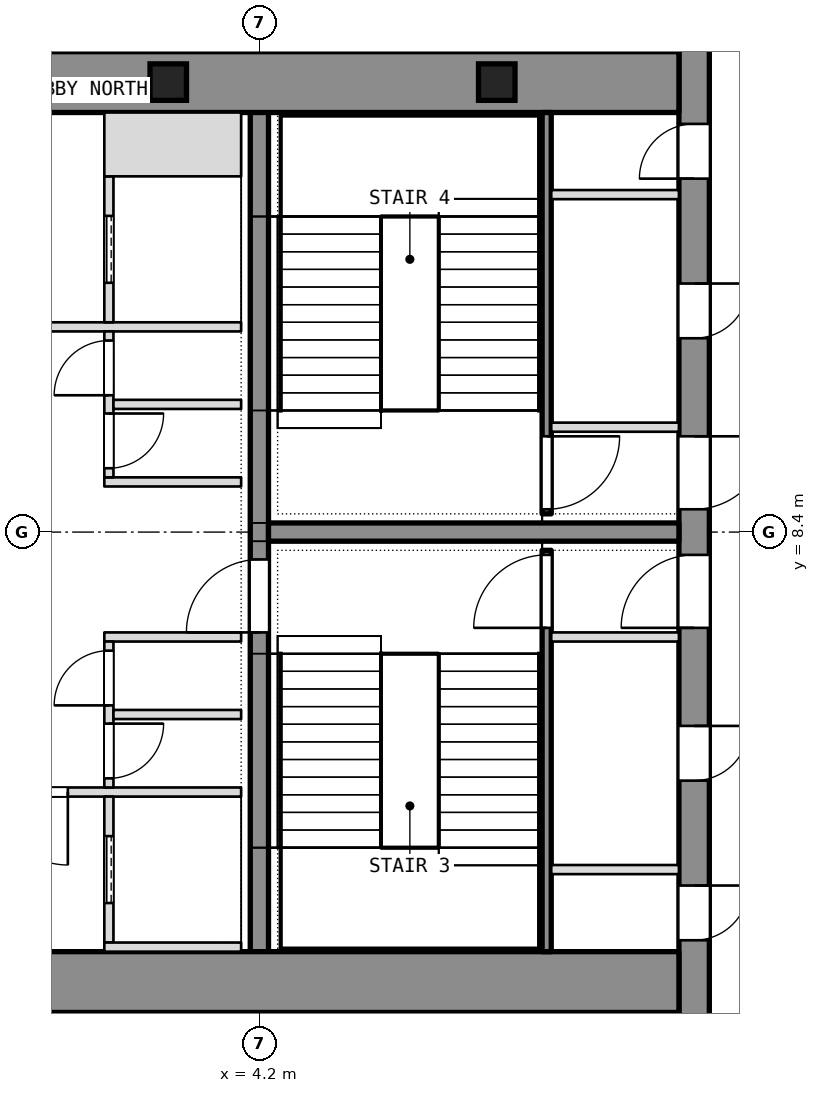
"""IFC4 building model, lengths in metres.
Left out: names, types, materials, properties, quantities, classifications, styles, units other than length and angle.
Written with IfcOpenShell. Run it as: python <this file> out.ifc"""

import sys

from ifc_helpers import new_model, si_unit, direction, frame, frame_2d, origin, origin_2d, place, context, subcontext, project, spatial, rectangle, extrude, element, fill, save


model = new_model("IFC4")
c1 = context("Model", 3, precision=1e-05, world=origin(), true_north=direction((0.0, 1.0)))
c2 = subcontext(c1, "Body", "Model", "MODEL_VIEW")
j1 = project(units=[si_unit("LENGTHUNIT", "METRE"), si_unit("PLANEANGLEUNIT", "RADIAN")], contexts=[c1])
p1 = place(None, origin())
s1 = spatial("IfcSite", under=j1, at=p1, CompositionType="ELEMENT")
p2 = place(p1, origin())
s2 = spatial("IfcBuilding", under=s1, at=p2, CompositionType="ELEMENT")
p3 = place(p2, frame((0.0, 0.0, 288.5)))
s3 = spatial("IfcBuildingStorey", under=s2, at=p3, CompositionType="ELEMENT", Elevation=288.5)
p4 = place(p3, frame((11.35, 0.0, 0.0), z_axis=(0.0, 0.0, 1.0), x_axis=(0.0, 1.0, 0.0)))
e1 = element("IfcWall", 1, at=p4, inside=s3, PredefinedType="SHEAR", context=c2, shape_type="SweptSolid", body=[
    extrude(rectangle(XDim=16.8, YDim=0.5, at=frame_2d((8.4, 0.0))), origin(), (0.0, 0.0, 1.0), 7.2),
])
p5 = place(p4, frame((1.688, 0.0, 0.0)))
e2 = element("IfcOpeningElement", 2, at=p5, cuts=e1, PredefinedType="OPENING", context=c2, shape_type="SweptSolid", body=[
    extrude(rectangle(XDim=0.9, YDim=2.1, at=frame_2d((0.45, 1.05))), frame((0.0, 0.25, 0.0), z_axis=(0.0, -1.0, 0.0), x_axis=(1.0, 0.0, 0.0)), (0.0, 0.0, 1.0), 0.5),
])
p6 = place(p4, frame((4.312, 0.0, 0.0)))
e3 = element("IfcOpeningElement", 3, at=p6, cuts=e1, PredefinedType="OPENING", context=c2, shape_type="SweptSolid", body=[
    extrude(rectangle(XDim=0.9, YDim=2.1, at=frame_2d((0.45, 1.05))), frame((0.0, 0.25, 0.0), z_axis=(0.0, -1.0, 0.0), x_axis=(1.0, 0.0, 0.0)), (0.0, 0.0, 1.0), 0.5),
])
p7 = place(p4, frame((6.825, 0.0, 0.0)))
e4 = element("IfcOpeningElement", 4, at=p7, cuts=e1, PredefinedType="OPENING", context=c2, shape_type="SweptSolid", body=[
    extrude(rectangle(XDim=1.2, YDim=2.1, at=frame_2d((0.6, 1.05))), frame((0.0, 0.25, 0.0), z_axis=(0.0, -1.0, 0.0), x_axis=(1.0, 0.0, 0.0)), (0.0, 0.0, 1.0), 0.5),
])
p8 = place(p4, frame((14.212, 0.0, 0.0)))
e5 = element("IfcOpeningElement", 5, at=p8, cuts=e1, PredefinedType="OPENING", context=c2, shape_type="SweptSolid", body=[
    extrude(rectangle(XDim=0.9, YDim=2.1, at=frame_2d((0.45, 1.05))), frame((0.0, 0.25, 0.0), z_axis=(0.0, -1.0, 0.0), x_axis=(1.0, 0.0, 0.0)), (0.0, 0.0, 1.0), 0.5),
])
p9 = place(p4, frame((11.587, 0.0, 0.0)))
e6 = element("IfcOpeningElement", 6, at=p9, cuts=e1, PredefinedType="OPENING", context=c2, shape_type="SweptSolid", body=[
    extrude(rectangle(XDim=0.9, YDim=2.1, at=frame_2d((0.45, 1.05))), frame((0.0, 0.25, 0.0), z_axis=(0.0, -1.0, 0.0), x_axis=(1.0, 0.0, 0.0)), (0.0, 0.0, 1.0), 0.5),
])
p10 = place(p4, frame((8.775, 0.0, 0.0)))
e7 = element("IfcOpeningElement", 7, at=p10, cuts=e1, PredefinedType="OPENING", context=c2, shape_type="SweptSolid", body=[
    extrude(rectangle(XDim=1.2, YDim=2.1, at=frame_2d((0.6, 1.05))), frame((0.0, 0.25, 0.0), z_axis=(0.0, -1.0, 0.0), x_axis=(1.0, 0.0, 0.0)), (0.0, 0.0, 1.0), 0.5),
])
p11 = place(p3, frame((4.2, 0.5, 0.0), z_axis=(0.0, 0.0, 1.0), x_axis=(0.0, 1.0, 0.0)))
e8 = element("IfcWall", 8, at=p11, inside=s3, PredefinedType="SHEAR", context=c2, shape_type="SweptSolid", body=[
    extrude(rectangle(XDim=15.8, YDim=0.3, at=frame_2d((7.9, 0.0))), origin(), (0.0, 0.0, 1.0), 7.2),
])
p12 = place(p11, frame((6.25, 0.0, 0.0)))
e9 = element("IfcOpeningElement", 9, at=p12, cuts=e8, PredefinedType="OPENING", context=c2, shape_type="SweptSolid", body=[
    extrude(rectangle(XDim=1.2, YDim=2.1, at=frame_2d((0.6, 1.05))), frame((0.0, 0.15, 0.0), z_axis=(0.0, -1.0, 0.0), x_axis=(1.0, 0.0, 0.0)), (0.0, 0.0, 1.0), 0.3),
])
p13 = place(p3, frame((4.35, 8.4, 0.0), z_axis=(0.0, 0.0, 1.0), x_axis=(1.0, 0.0, 0.0)))
e10 = element("IfcWall", 10, at=p13, inside=s3, PredefinedType="SHEAR", context=c2, shape_type="SweptSolid", body=[
    extrude(rectangle(XDim=6.75, YDim=0.3, at=frame_2d((3.375, 0.0))), origin(), (0.0, 0.0, 1.0), 7.2),
])
for number, where, z_axis, x_axis in (
    (11, (2.701, 15.8, 0.0), (0.0, 0.0, 1.0), (1.0, 0.0, 0.0)),
    (12, (8.104, 15.8, 0.0), (0.0, 0.0, 1.0), (1.0, 0.0, 0.0)),
):
    element("IfcColumn", number, at=place(p3, frame(where, z_axis=z_axis, x_axis=x_axis)), inside=s3, PredefinedType="COLUMN", context=c2, shape_type="SweptSolid", body=[
        extrude(rectangle(XDim=0.6, YDim=0.6, at=origin_2d()), origin(), (0.0, 0.0, 1.0), 6.9),
    ])
for number, where, z_axis, x_axis in (
    (13, (-11.1, 1.0, 0.0), (0.0, 0.0, 1.0), (1.0, 0.0, 0.0)),
    (14, (-11.1, 15.8, 0.0), (0.0, 0.0, 1.0), (1.0, 0.0, 0.0)),
):
    element("IfcWall", number, at=place(p3, frame(where, z_axis=z_axis, x_axis=x_axis)), inside=s3, PredefinedType="PARTITIONING", context=c2, shape_type="SweptSolid", body=[
        extrude(rectangle(XDim=22.2, YDim=1.0, at=frame_2d((11.1, 0.0))), origin(), (0.0, 0.0, 1.0), 6.9),
    ])
p14 = place(p3, frame((8.925, 1.5, 0.0), z_axis=(0.0, 0.0, 1.0), x_axis=(0.0, 1.0, 0.0)))
e15 = element("IfcWall", 15, at=p14, inside=s3, PredefinedType="SHEAR", context=c2, shape_type="SweptSolid", body=[
    extrude(rectangle(XDim=6.6, YDim=0.15, at=frame_2d((3.3, 0.0))), origin(), (0.0, 0.0, 1.0), 6.9),
])
p15 = place(p14, frame((5.325, 0.0, 0.0)))
e16 = element("IfcOpeningElement", 16, at=p15, cuts=e15, PredefinedType="OPENING", context=c2, shape_type="SweptSolid", body=[
    extrude(rectangle(XDim=1.2, YDim=2.1, at=frame_2d((0.6, 1.05))), frame((0.0, 0.075, 0.0), z_axis=(0.0, -1.0, 0.0), x_axis=(1.0, 0.0, 0.0)), (0.0, 0.0, 1.0), 0.15),
])
for number, where, z_axis, x_axis in (
    (17, (9.0, 6.675, 0.0), (0.0, 0.0, 1.0), (1.0, 0.0, 0.0)),
    (18, (9.0, 2.85, 0.0), (0.0, 0.0, 1.0), (1.0, 0.0, 0.0)),
):
    element("IfcWall", number, at=place(p3, frame(where, z_axis=z_axis, x_axis=x_axis)), inside=s3, PredefinedType="PARTITIONING", context=c2, shape_type="SweptSolid", body=[
        extrude(rectangle(XDim=2.1, YDim=0.15, at=frame_2d((1.05, 0.0))), origin(), (0.0, 0.0, 1.0), 6.9),
    ])
p16 = place(p3, frame((8.925, 8.7, 0.0), z_axis=(0.0, 0.0, 1.0), x_axis=(0.0, 1.0, 0.0)))
e19 = element("IfcWall", 19, at=p16, inside=s3, PredefinedType="SHEAR", context=c2, shape_type="SweptSolid", body=[
    extrude(rectangle(XDim=6.6, YDim=0.15, at=frame_2d((3.3, 0.0))), origin(), (0.0, 0.0, 1.0), 6.9),
])
p17 = place(p16, frame((0.075, 0.0, 0.0)))
e20 = element("IfcOpeningElement", 20, at=p17, cuts=e19, PredefinedType="OPENING", context=c2, shape_type="SweptSolid", body=[
    extrude(rectangle(XDim=1.2, YDim=2.1, at=frame_2d((0.6, 1.05))), frame((0.0, 0.075, 0.0), z_axis=(0.0, -1.0, 0.0), x_axis=(1.0, 0.0, 0.0)), (0.0, 0.0, 1.0), 0.15),
])
for number, where, z_axis, x_axis in (
    (21, (9.0, 10.125, 0.0), (0.0, 0.0, 1.0), (1.0, 0.0, 0.0)),
    (22, (9.0, 13.95, 0.0), (0.0, 0.0, 1.0), (1.0, 0.0, 0.0)),
):
    element("IfcWall", number, at=place(p3, frame(where, z_axis=z_axis, x_axis=x_axis)), inside=s3, PredefinedType="PARTITIONING", context=c2, shape_type="SweptSolid", body=[
        extrude(rectangle(XDim=2.1, YDim=0.15, at=frame_2d((1.05, 0.0))), origin(), (0.0, 0.0, 1.0), 6.9),
    ])
p18 = place(p3, frame((-3.9, 4.125, 0.0), z_axis=(0.0, 0.0, 1.0), x_axis=(1.0, 0.0, 0.0)))
e23 = element("IfcWall", 23, at=p18, inside=s3, PredefinedType="PARTITIONING", context=c2, shape_type="SweptSolid", body=[
    extrude(rectangle(XDim=7.8, YDim=0.15, at=frame_2d((3.9, 0.0))), origin(), (0.0, 0.0, 1.0), 6.9),
])
p19 = place(p18, frame((3.75, 0.0, 0.0)))
e24 = element("IfcOpeningElement", 24, at=p19, cuts=e23, PredefinedType="OPENING", context=c2, shape_type="SweptSolid", body=[
    extrude(rectangle(XDim=1.2, YDim=2.1, at=frame_2d((0.6, 1.05))), frame((0.0, 0.075, 0.0), z_axis=(0.0, -1.0, 0.0), x_axis=(1.0, 0.0, 0.0)), (0.0, 0.0, 1.0), 0.15),
])
p20 = place(p3, frame((-3.9, 11.775, 0.0), z_axis=(0.0, 0.0, 1.0), x_axis=(1.0, 0.0, 0.0)))
e25 = element("IfcWall", 25, at=p20, inside=s3, PredefinedType="PARTITIONING", context=c2, shape_type="SweptSolid", body=[
    extrude(rectangle(XDim=7.8, YDim=0.15, at=frame_2d((3.9, 0.0))), origin(), (0.0, 0.0, 1.0), 6.9),
])
p21 = place(p20, frame((3.3, 0.0, 0.0)))
e26 = element("IfcOpeningElement", 26, at=p21, cuts=e25, PredefinedType="OPENING", context=c2, shape_type="SweptSolid", body=[
    extrude(rectangle(XDim=1.2, YDim=2.1, at=frame_2d((0.6, 1.05))), frame((0.0, 0.075, 0.0), z_axis=(0.0, -1.0, 0.0), x_axis=(1.0, 0.0, 0.0)), (0.0, 0.0, 1.0), 0.15),
])
p22 = place(p3, frame((1.725, 1.65, 0.0), z_axis=(0.0, 0.0, 1.0), x_axis=(0.0, 1.0, 0.0)))
e27 = element("IfcWall", 27, at=p22, inside=s3, PredefinedType="SHEAR", context=c2, shape_type="SweptSolid", body=[
    extrude(rectangle(XDim=2.4, YDim=0.15, at=frame_2d((1.2, 0.0))), origin(), (0.0, 0.0, 1.0), 7.2),
])
p23 = place(p22, frame((0.65, 0.0, 0.0)))
e28 = element("IfcOpeningElement", 28, at=p23, cuts=e27, PredefinedType="OPENING", context=c2, shape_type="SweptSolid", body=[
    extrude(rectangle(XDim=1.1, YDim=2.1, at=frame_2d((0.55, 1.05))), frame((0.0, 0.075, 0.0), z_axis=(0.0, -1.0, 0.0), x_axis=(1.0, 0.0, 0.0)), (0.0, 0.0, 1.0), 0.15),
])
p24 = place(p3, frame((1.65, 1.575, 0.0), z_axis=(0.0, 0.0, 1.0), x_axis=(1.0, 0.0, 0.0)))
e29 = element("IfcWall", 29, at=p24, inside=s3, PredefinedType="SHEAR", context=c2, shape_type="SweptSolid", body=[
    extrude(rectangle(XDim=2.25, YDim=0.15, at=frame_2d((1.125, 0.0))), origin(), (0.0, 0.0, 1.0), 7.2),
])
p25 = place(p3, frame((1.725, 11.85, 0.0), z_axis=(0.0, 0.0, 1.0), x_axis=(0.0, 1.0, 0.0)))
e30 = element("IfcWall", 30, at=p25, inside=s3, PredefinedType="SHEAR", context=c2, shape_type="SweptSolid", body=[
    extrude(rectangle(XDim=2.4, YDim=0.15, at=frame_2d((1.2, 0.0))), origin(), (0.0, 0.0, 1.0), 7.2),
])
p26 = place(p25, frame((0.65, 0.0, 0.0)))
e31 = element("IfcOpeningElement", 31, at=p26, cuts=e30, PredefinedType="OPENING", context=c2, shape_type="SweptSolid", body=[
    extrude(rectangle(XDim=1.1, YDim=2.1, at=frame_2d((0.55, 1.05))), frame((0.0, 0.075, 0.0), z_axis=(0.0, -1.0, 0.0), x_axis=(1.0, 0.0, 0.0)), (0.0, 0.0, 1.0), 0.15),
])
p27 = place(p3, frame((1.65, 14.775, 0.0), z_axis=(0.0, 0.0, 1.0), x_axis=(1.0, 0.0, 0.0)))
e32 = element("IfcWall", 32, at=p27, inside=s3, PredefinedType="SHEAR", context=c2, shape_type="SweptSolid", body=[
    extrude(rectangle(XDim=2.25, YDim=1.05, at=frame_2d((1.125, 0.0))), origin(), (0.0, 0.0, 1.0), 7.2),
])
for number, where, z_axis, x_axis in (
    (33, (1.65, 6.675, 0.0), (0.0, 0.0, 1.0), (1.0, 0.0, 0.0)),
    (34, (1.65, 9.225, 0.0), (0.0, 0.0, 1.0), (1.0, 0.0, 0.0)),
):
    element("IfcWall", number, at=place(p3, frame(where, z_axis=z_axis, x_axis=x_axis)), inside=s3, PredefinedType="PARTITIONING", context=c2, shape_type="SweptSolid", body=[
        extrude(rectangle(XDim=2.25, YDim=0.15, at=frame_2d((1.125, 0.0))), origin(), (0.0, 0.0, 1.0), 6.9),
    ])
p28 = place(p3, frame((1.725, 4.2, 0.0), z_axis=(0.0, 0.0, 1.0), x_axis=(0.0, 1.0, 0.0)))
e35 = element("IfcWall", 35, at=p28, inside=s3, PredefinedType="PARTITIONING", context=c2, shape_type="SweptSolid", body=[
    extrude(rectangle(XDim=2.4, YDim=0.15, at=frame_2d((1.2, 0.0))), origin(), (0.0, 0.0, 1.0), 6.9),
])
p29 = place(p28, frame((0.15, 0.0, 0.0)))
e36 = element("IfcOpeningElement", 36, at=p29, cuts=e35, PredefinedType="OPENING", context=c2, shape_type="SweptSolid", body=[
    extrude(rectangle(XDim=0.9, YDim=2.1, at=frame_2d((0.45, 1.05))), frame((0.0, 0.075, 0.0), z_axis=(0.0, -1.0, 0.0), x_axis=(1.0, 0.0, 0.0)), (0.0, 0.0, 1.0), 0.15),
])
p30 = place(p28, frame((1.35, 0.0, 0.0)))
e37 = element("IfcOpeningElement", 37, at=p30, cuts=e35, PredefinedType="OPENING", context=c2, shape_type="SweptSolid", body=[
    extrude(rectangle(XDim=0.9, YDim=2.1, at=frame_2d((0.45, 1.05))), frame((0.0, 0.075, 0.0), z_axis=(0.0, -1.0, 0.0), x_axis=(1.0, 0.0, 0.0)), (0.0, 0.0, 1.0), 0.15),
])
p31 = place(p3, frame((1.725, 9.3, 0.0), z_axis=(0.0, 0.0, 1.0), x_axis=(0.0, 1.0, 0.0)))
e38 = element("IfcWall", 38, at=p31, inside=s3, PredefinedType="PARTITIONING", context=c2, shape_type="SweptSolid", body=[
    extrude(rectangle(XDim=2.4, YDim=0.15, at=frame_2d((1.2, 0.0))), origin(), (0.0, 0.0, 1.0), 6.9),
])
p32 = place(p31, frame((0.15, 0.0, 0.0)))
e39 = element("IfcOpeningElement", 39, at=p32, cuts=e38, PredefinedType="OPENING", context=c2, shape_type="SweptSolid", body=[
    extrude(rectangle(XDim=0.9, YDim=2.1, at=frame_2d((0.45, 1.05))), frame((0.0, 0.075, 0.0), z_axis=(0.0, -1.0, 0.0), x_axis=(1.0, 0.0, 0.0)), (0.0, 0.0, 1.0), 0.15),
])
p33 = place(p31, frame((1.35, 0.0, 0.0)))
e40 = element("IfcOpeningElement", 40, at=p33, cuts=e38, PredefinedType="OPENING", context=c2, shape_type="SweptSolid", body=[
    extrude(rectangle(XDim=0.9, YDim=2.1, at=frame_2d((0.45, 1.05))), frame((0.0, 0.075, 0.0), z_axis=(0.0, -1.0, 0.0), x_axis=(1.0, 0.0, 0.0)), (0.0, 0.0, 1.0), 0.15),
])
for number, where, z_axis, x_axis in (
    (41, (1.8, 5.4, 0.0), (0.0, 0.0, 1.0), (1.0, 0.0, 0.0)),
    (42, (1.8, 10.5, 0.0), (0.0, 0.0, 1.0), (1.0, 0.0, 0.0)),
):
    element("IfcWall", number, at=place(p3, frame(where, z_axis=z_axis, x_axis=x_axis)), inside=s3, PredefinedType="PARTITIONING", context=c2, shape_type="SweptSolid", body=[
        extrude(rectangle(XDim=2.1, YDim=0.15, at=frame_2d((1.05, 0.0))), origin(), (0.0, 0.0, 1.0), 6.9),
    ])
p34 = place(p5, origin())
e43 = element("IfcDoor", 43, at=p34, inside=s3, OperationType="SINGLE_SWING_LEFT", PredefinedType="DOOR", context=c2, shape_type="SweptSolid", body=[
    extrude(rectangle(XDim=0.9, YDim=2.1, at=frame_2d((0.45, 1.05))), frame((0.0, 0.025, 0.0), z_axis=(0.0, -1.0, 0.0), x_axis=(1.0, 0.0, 0.0)), (0.0, 0.0, 1.0), 0.05),
])
fill(e2, e43)
p35 = place(p6, origin())
e44 = element("IfcDoor", 44, at=p35, inside=s3, OperationType="SINGLE_SWING_LEFT", PredefinedType="DOOR", context=c2, shape_type="SweptSolid", body=[
    extrude(rectangle(XDim=0.9, YDim=2.1, at=frame_2d((0.45, 1.05))), frame((0.0, 0.025, 0.0), z_axis=(0.0, -1.0, 0.0), x_axis=(1.0, 0.0, 0.0)), (0.0, 0.0, 1.0), 0.05),
])
fill(e3, e44)
p36 = place(p7, origin())
e45 = element("IfcDoor", 45, at=p36, inside=s3, OperationType="SINGLE_SWING_LEFT", PredefinedType="DOOR", context=c2, shape_type="SweptSolid", body=[
    extrude(rectangle(XDim=1.2, YDim=2.1, at=frame_2d((0.6, 1.05))), frame((0.0, 0.025, 0.0), z_axis=(0.0, -1.0, 0.0), x_axis=(1.0, 0.0, 0.0)), (0.0, 0.0, 1.0), 0.05),
])
fill(e4, e45)
p37 = place(p15, origin())
e46 = element("IfcDoor", 46, at=p37, inside=s3, OperationType="SINGLE_SWING_LEFT", PredefinedType="DOOR", context=c2, shape_type="SweptSolid", body=[
    extrude(rectangle(XDim=1.2, YDim=2.1, at=frame_2d((0.6, 1.05))), frame((0.0, 0.025, 0.0), z_axis=(0.0, -1.0, 0.0), x_axis=(1.0, 0.0, 0.0)), (0.0, 0.0, 1.0), 0.05),
])
fill(e16, e46)
p38 = place(p8, origin())
e47 = element("IfcDoor", 47, at=p38, inside=s3, OperationType="SINGLE_SWING_LEFT", PredefinedType="DOOR", context=c2, shape_type="SweptSolid", body=[
    extrude(rectangle(XDim=0.9, YDim=2.1, at=frame_2d((0.45, 1.05))), frame((0.0, 0.025, 0.0), z_axis=(0.0, -1.0, 0.0), x_axis=(1.0, 0.0, 0.0)), (0.0, 0.0, 1.0), 0.05),
])
fill(e5, e47)
p39 = place(p9, origin())
e48 = element("IfcDoor", 48, at=p39, inside=s3, OperationType="SINGLE_SWING_LEFT", PredefinedType="DOOR", context=c2, shape_type="SweptSolid", body=[
    extrude(rectangle(XDim=0.9, YDim=2.1, at=frame_2d((0.45, 1.05))), frame((0.0, 0.025, 0.0), z_axis=(0.0, -1.0, 0.0), x_axis=(1.0, 0.0, 0.0)), (0.0, 0.0, 1.0), 0.05),
])
fill(e6, e48)
p40 = place(p10, origin())
e49 = element("IfcDoor", 49, at=p40, inside=s3, OperationType="SINGLE_SWING_LEFT", PredefinedType="DOOR", context=c2, shape_type="SweptSolid", body=[
    extrude(rectangle(XDim=1.2, YDim=2.1, at=frame_2d((0.6, 1.05))), frame((0.0, 0.025, 0.0), z_axis=(0.0, -1.0, 0.0), x_axis=(1.0, 0.0, 0.0)), (0.0, 0.0, 1.0), 0.05),
])
fill(e7, e49)
p41 = place(p17, origin())
e50 = element("IfcDoor", 50, at=p41, inside=s3, OperationType="SINGLE_SWING_LEFT", PredefinedType="DOOR", context=c2, shape_type="SweptSolid", body=[
    extrude(rectangle(XDim=1.2, YDim=2.1, at=frame_2d((0.6, 1.05))), frame((0.0, 0.025, 0.0), z_axis=(0.0, -1.0, 0.0), x_axis=(1.0, 0.0, 0.0)), (0.0, 0.0, 1.0), 0.05),
])
fill(e20, e50)
p42 = place(p29, origin())
e51 = element("IfcDoor", 51, at=p42, inside=s3, OperationType="SINGLE_SWING_LEFT", PredefinedType="DOOR", context=c2, shape_type="SweptSolid", body=[
    extrude(rectangle(XDim=0.9, YDim=2.1, at=frame_2d((0.45, 1.05))), frame((0.0, 0.025, 0.0), z_axis=(0.0, -1.0, 0.0), x_axis=(1.0, 0.0, 0.0)), (0.0, 0.0, 1.0), 0.05),
])
fill(e36, e51)
p43 = place(p30, origin())
e52 = element("IfcDoor", 52, at=p43, inside=s3, OperationType="SINGLE_SWING_LEFT", PredefinedType="DOOR", context=c2, shape_type="SweptSolid", body=[
    extrude(rectangle(XDim=0.9, YDim=2.1, at=frame_2d((0.45, 1.05))), frame((0.0, 0.025, 0.0), z_axis=(0.0, -1.0, 0.0), x_axis=(1.0, 0.0, 0.0)), (0.0, 0.0, 1.0), 0.05),
])
fill(e37, e52)
p44 = place(p32, origin())
e53 = element("IfcDoor", 53, at=p44, inside=s3, OperationType="SINGLE_SWING_LEFT", PredefinedType="DOOR", context=c2, shape_type="SweptSolid", body=[
    extrude(rectangle(XDim=0.9, YDim=2.1, at=frame_2d((0.45, 1.05))), frame((0.0, 0.025, 0.0), z_axis=(0.0, -1.0, 0.0), x_axis=(1.0, 0.0, 0.0)), (0.0, 0.0, 1.0), 0.05),
])
fill(e39, e53)
p45 = place(p33, origin())
e54 = element("IfcDoor", 54, at=p45, inside=s3, OperationType="SINGLE_SWING_LEFT", PredefinedType="DOOR", context=c2, shape_type="SweptSolid", body=[
    extrude(rectangle(XDim=0.9, YDim=2.1, at=frame_2d((0.45, 1.05))), frame((0.0, 0.025, 0.0), z_axis=(0.0, -1.0, 0.0), x_axis=(1.0, 0.0, 0.0)), (0.0, 0.0, 1.0), 0.05),
])
fill(e40, e54)
p46 = place(p23, origin())
e55 = element("IfcDoor", 55, at=p46, inside=s3, OperationType="SLIDING_TO_LEFT", PredefinedType="DOOR", context=c2, shape_type="SweptSolid", body=[
    extrude(rectangle(XDim=1.1, YDim=2.1, at=frame_2d((0.55, 1.05))), frame((0.0, 0.025, 0.0), z_axis=(0.0, -1.0, 0.0), x_axis=(1.0, 0.0, 0.0)), (0.0, 0.0, 1.0), 0.05),
])
fill(e28, e55)
p47 = place(p26, origin())
e56 = element("IfcDoor", 56, at=p47, inside=s3, OperationType="SLIDING_TO_LEFT", PredefinedType="DOOR", context=c2, shape_type="SweptSolid", body=[
    extrude(rectangle(XDim=1.1, YDim=2.1, at=frame_2d((0.55, 1.05))), frame((0.0, 0.025, 0.0), z_axis=(0.0, -1.0, 0.0), x_axis=(1.0, 0.0, 0.0)), (0.0, 0.0, 1.0), 0.05),
])
fill(e31, e56)
p48 = place(p19, origin())
e57 = element("IfcDoor", 57, at=p48, inside=s3, OperationType="SINGLE_SWING_LEFT", PredefinedType="DOOR", context=c2, shape_type="SweptSolid", body=[
    extrude(rectangle(XDim=1.2, YDim=2.1, at=frame_2d((0.6, 1.05))), frame((0.0, 0.025, 0.0), z_axis=(0.0, -1.0, 0.0), x_axis=(1.0, 0.0, 0.0)), (0.0, 0.0, 1.0), 0.05),
])
fill(e24, e57)
p49 = place(p12, origin())
e58 = element("IfcDoor", 58, at=p49, inside=s3, OperationType="SINGLE_SWING_LEFT", PredefinedType="DOOR", context=c2, shape_type="SweptSolid", body=[
    extrude(rectangle(XDim=1.2, YDim=2.1, at=frame_2d((0.6, 1.05))), frame((0.0, 0.025, 0.0), z_axis=(0.0, -1.0, 0.0), x_axis=(1.0, 0.0, 0.0)), (0.0, 0.0, 1.0), 0.05),
])
fill(e9, e58)
save(model, sys.argv[1])
